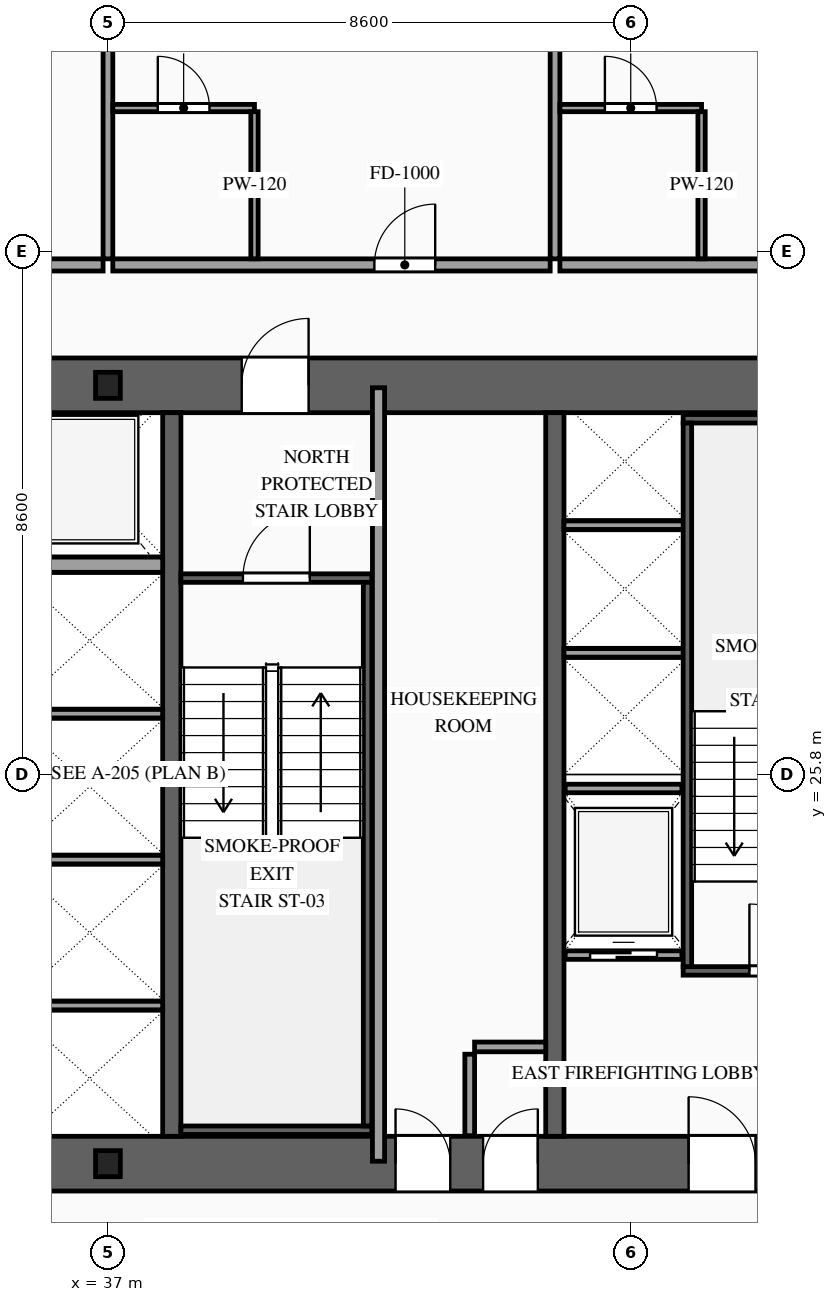
"""IFC4 building model, lengths in metres.
Left out: names, types, materials, properties, quantities, classifications, styles, units other than length and angle.
Written with IfcOpenShell. Run it as: python <this file> out.ifc"""

import sys

from ifc_helpers import new_model, si_unit, direction, frame, frame_2d, origin, origin_2d, place, context, subcontext, project, spatial, rectangle, i_section, extrude, source, transform, mapped, element, fill, save


model = new_model("IFC4")
c1 = context("Model", 3, precision=1e-05, world=origin(), true_north=direction((0.0, 1.0)))
c2 = subcontext(c1, "Body", "Model", "MODEL_VIEW")
j1 = project(units=[si_unit("LENGTHUNIT", "METRE"), si_unit("PLANEANGLEUNIT", "RADIAN")], contexts=[c1])
p1 = place(None, origin())
s1 = spatial("IfcSite", under=j1, at=p1, CompositionType="ELEMENT")
p2 = place(p1, origin())
s2 = spatial("IfcBuilding", under=s1, at=p2, CompositionType="ELEMENT")
p3 = place(p2, frame((0.0, 0.0, 37.8)))
s3 = spatial("IfcBuildingStorey", under=s2, at=p3, CompositionType="ELEMENT", Elevation=37.8)
p4 = place(p3, frame((23.35, 19.4, 0.0), z_axis=(0.0, 0.0, 1.0), x_axis=(1.0, 0.0, 0.0)))
e1 = element("IfcWall", 1, at=p4, inside=s3, PredefinedType="SHEAR", context=c2, shape_type="SweptSolid", body=[
    extrude(rectangle(XDim=27.3, YDim=0.9, at=frame_2d((13.65, 0.0))), origin(), (0.0, 0.0, 1.0), 3.6),
])
p5 = place(p4, frame((2.1, 0.0, 0.0)))
e2 = element("IfcOpeningElement", 2, at=p5, cuts=e1, PredefinedType="OPENING", context=c2, shape_type="SweptSolid", body=[
    extrude(rectangle(XDim=1.1, YDim=2.2, at=frame_2d((0.55, 1.1))), frame((0.0, 0.465, 0.0), z_axis=(0.0, -1.0, 0.0), x_axis=(1.0, 0.0, 0.0)), (0.0, 0.0, 1.0), 0.93),
])
p6 = place(p4, frame((10.0, 0.0, 0.0)))
e3 = element("IfcOpeningElement", 3, at=p6, cuts=e1, PredefinedType="OPENING", context=c2, shape_type="SweptSolid", body=[
    extrude(rectangle(XDim=1.1, YDim=2.2, at=frame_2d((0.55, 1.1))), frame((0.0, 0.465, 0.0), z_axis=(0.0, -1.0, 0.0), x_axis=(1.0, 0.0, 0.0)), (0.0, 0.0, 1.0), 0.93),
])
p7 = place(p4, frame((23.2, 0.0, 0.0)))
e4 = element("IfcOpeningElement", 4, at=p7, cuts=e1, PredefinedType="OPENING", context=c2, shape_type="SweptSolid", body=[
    extrude(rectangle(XDim=1.1, YDim=2.2, at=frame_2d((0.55, 1.1))), frame((0.0, 0.465, 0.0), z_axis=(0.0, -1.0, 0.0), x_axis=(1.0, 0.0, 0.0)), (0.0, 0.0, 1.0), 0.93),
])
p8 = place(p4, frame((19.82, 0.0, 0.0)))
e5 = element("IfcOpeningElement", 5, at=p8, cuts=e1, PredefinedType="OPENING", context=c2, shape_type="SweptSolid", body=[
    extrude(rectangle(XDim=0.9, YDim=2.15, at=frame_2d((0.45, 1.075))), frame((0.0, 0.465, 0.0), z_axis=(0.0, -1.0, 0.0), x_axis=(1.0, 0.0, 0.0)), (0.0, 0.0, 1.0), 0.93),
])
p9 = place(p4, frame((18.38, 0.0, 0.0)))
e6 = element("IfcOpeningElement", 6, at=p9, cuts=e1, PredefinedType="OPENING", context=c2, shape_type="SweptSolid", body=[
    extrude(rectangle(XDim=0.9, YDim=2.15, at=frame_2d((0.45, 1.075))), frame((0.0, 0.465, 0.0), z_axis=(0.0, -1.0, 0.0), x_axis=(1.0, 0.0, 0.0)), (0.0, 0.0, 1.0), 0.93),
])
p10 = place(p3, frame((23.35, 32.2, 0.0), z_axis=(0.0, 0.0, 1.0), x_axis=(1.0, 0.0, 0.0)))
e7 = element("IfcWall", 7, at=p10, inside=s3, PredefinedType="SHEAR", context=c2, shape_type="SweptSolid", body=[
    extrude(rectangle(XDim=27.3, YDim=0.9, at=frame_2d((13.65, 0.0))), origin(), (0.0, 0.0, 1.0), 3.6),
])
p11 = place(p10, frame((4.72, 0.0, 0.0)))
e8 = element("IfcOpeningElement", 8, at=p11, cuts=e7, PredefinedType="OPENING", context=c2, shape_type="SweptSolid", body=[
    extrude(rectangle(XDim=0.9, YDim=2.15, at=frame_2d((0.45, 1.075))), frame((0.0, 0.465, 0.0), z_axis=(0.0, -1.0, 0.0), x_axis=(1.0, 0.0, 0.0)), (0.0, 0.0, 1.0), 0.93),
])
p12 = place(p10, frame((10.0, 0.0, 0.0)))
e9 = element("IfcOpeningElement", 9, at=p12, cuts=e7, PredefinedType="OPENING", context=c2, shape_type="SweptSolid", body=[
    extrude(rectangle(XDim=1.1, YDim=2.2, at=frame_2d((0.55, 1.1))), frame((0.0, 0.465, 0.0), z_axis=(0.0, -1.0, 0.0), x_axis=(1.0, 0.0, 0.0)), (0.0, 0.0, 1.0), 0.93),
])
p13 = place(p10, frame((15.85, 0.0, 0.0)))
e10 = element("IfcOpeningElement", 10, at=p13, cuts=e7, PredefinedType="OPENING", context=c2, shape_type="SweptSolid", body=[
    extrude(rectangle(XDim=1.1, YDim=2.2, at=frame_2d((0.55, 1.1))), frame((0.0, 0.465, 0.0), z_axis=(0.0, -1.0, 0.0), x_axis=(1.0, 0.0, 0.0)), (0.0, 0.0, 1.0), 0.93),
])
m1 = source(origin(), c2, "Body", "SweptSolid", [
    extrude(rectangle(XDim=11.9, YDim=0.3, at=frame_2d((5.95, 0.0))), origin(), (0.0, 0.0, 1.0), 3.6),
])
for number, where, z_axis, x_axis in (
    (11, (38.05, 19.85, 0.0), (0.0, 0.0, 1.0), (0.0, 1.0, 0.0)),
    (12, (44.35, 19.85, 0.0), (0.0, 0.0, 1.0), (0.0, 1.0, 0.0)),
):
    element("IfcWall", number, at=place(p3, frame(where, z_axis=z_axis, x_axis=x_axis)), inside=s3, PredefinedType="SOLIDWALL", context=c2, shape_type="MappedRepresentation", body=[
        mapped(m1, transform((0.0, 0.0, 0.0), scale=1.0)),
    ])
m2 = source(origin(), c2, "Body", "SweptSolid", [
    extrude(i_section(OverallWidth=0.407, OverallDepth=0.428, WebThickness=0.02, FlangeThickness=0.035, at=origin_2d()), origin(), (0.0, 0.0, 1.0), 3.6),
])
for number, where, z_axis, x_axis in (
    (13, (37.0, 19.4, 0.0), (0.0, 0.0, 1.0), (1.0, 0.0, 0.0)),
    (14, (37.0, 32.2, 0.0), (0.0, 0.0, 1.0), (1.0, 0.0, 0.0)),
):
    element("IfcColumn", number, at=place(p3, frame(where, z_axis=z_axis, x_axis=x_axis)), inside=s3, PredefinedType="COLUMN", context=c2, shape_type="MappedRepresentation", body=[
        mapped(m2, transform((0.0, 0.0, 0.0), scale=1.0)),
    ])
p14 = place(p3, frame((44.52, 22.83, 0.0), z_axis=(0.0, 0.0, 1.0), x_axis=(1.0, 0.0, 0.0)))
e15 = element("IfcWall", 15, at=p14, inside=s3, PredefinedType="SOLIDWALL", context=c2, shape_type="SweptSolid", body=[
    extrude(rectangle(XDim=1.92, YDim=0.14, at=frame_2d((0.96, 0.0))), origin(), (0.0, 0.0, 1.0), 3.32),
])
p15 = place(p14, frame((0.41, 0.0, 0.0)))
e16 = element("IfcOpeningElement", 16, at=p15, cuts=e15, PredefinedType="OPENING", context=c2, shape_type="SweptSolid", body=[
    extrude(rectangle(XDim=1.1, YDim=2.2, at=frame_2d((0.55, 1.1))), frame((0.0, 0.085, 0.0), z_axis=(0.0, -1.0, 0.0), x_axis=(1.0, 0.0, 0.0)), (0.0, 0.0, 1.0), 0.17),
])
m3 = source(origin(), c2, "Body", "SweptSolid", [
    extrude(rectangle(XDim=1.92, YDim=0.14, at=frame_2d((0.96, 0.0))), origin(), (0.0, 0.0, 1.0), 3.32),
])
p16 = place(p3, frame((44.52, 25.57, 0.0), z_axis=(0.0, 0.0, 1.0), x_axis=(1.0, 0.0, 0.0)))
e17 = element("IfcWall", 17, at=p16, inside=s3, PredefinedType="SOLIDWALL", context=c2, shape_type="MappedRepresentation", body=[
    mapped(m3, transform((0.0, 0.0, 0.0), scale=1.0)),
])
m4 = source(origin(), c2, "Body", "SweptSolid", [
    extrude(rectangle(XDim=2.4, YDim=0.14, at=frame_2d((1.2, 0.0))), origin(), (0.0, 0.0, 1.0), 3.32),
])
for number, where, z_axis, x_axis in (
    (18, (35.5, 22.0, 0.0), (0.0, 0.0, 1.0), (1.0, 0.0, 0.0)),
    (19, (35.5, 24.4, 0.0), (0.0, 0.0, 1.0), (1.0, 0.0, 0.0)),
    (20, (35.5, 26.8, 0.0), (0.0, 0.0, 1.0), (1.0, 0.0, 0.0)),
):
    element("IfcWall", number, at=place(p3, frame(where, z_axis=z_axis, x_axis=x_axis)), inside=s3, PredefinedType="SOLIDWALL", context=c2, shape_type="MappedRepresentation", body=[
        mapped(m4, transform((0.0, 0.0, 0.0), scale=1.0)),
    ])
m5 = source(origin(), c2, "Body", "SweptSolid", [
    extrude(rectangle(XDim=2.4, YDim=0.25, at=frame_2d((1.2, 0.0))), origin(), (0.0, 0.0, 1.0), 3.32),
])
p17 = place(p3, frame((35.5, 29.25, 0.0), z_axis=(0.0, 0.0, 1.0), x_axis=(1.0, 0.0, 0.0)))
e21 = element("IfcWall", 21, at=p17, inside=s3, PredefinedType="SOLIDWALL", context=c2, shape_type="MappedRepresentation", body=[
    mapped(m5, transform((0.0, 0.0, 0.0), scale=1.0)),
])
m6 = source(origin(), c2, "Body", "SweptSolid", [
    extrude(rectangle(XDim=2.0, YDim=0.14, at=frame_2d((1.0, 0.0))), origin(), (0.0, 0.0, 1.0), 3.32),
])
for number, where, z_axis, x_axis in (
    (22, (44.5, 27.8, 0.0), (0.0, 0.0, 1.0), (1.0, 0.0, 0.0)),
    (23, (44.5, 29.9, 0.0), (0.0, 0.0, 1.0), (1.0, 0.0, 0.0)),
):
    element("IfcWall", number, at=place(p3, frame(where, z_axis=z_axis, x_axis=x_axis)), inside=s3, PredefinedType="SOLIDWALL", context=c2, shape_type="MappedRepresentation", body=[
        mapped(m6, transform((0.0, 0.0, 0.0), scale=1.0)),
    ])
p18 = place(p3, frame((46.46, 22.57, 0.0), z_axis=(0.0, 0.0, 1.0), x_axis=(1.0, 0.0, 0.0)))
e24 = element("IfcWall", 24, at=p18, inside=s3, PredefinedType="SOLIDWALL", context=c2, shape_type="SweptSolid", body=[
    extrude(rectangle(XDim=3.28, YDim=0.14, at=frame_2d((1.64, 0.0))), origin(), (0.0, 0.0, 1.0), 3.32),
])
p19 = place(p18, frame((1.09, 0.0, 0.0)))
e25 = element("IfcOpeningElement", 25, at=p19, cuts=e24, PredefinedType="OPENING", context=c2, shape_type="SweptSolid", body=[
    extrude(rectangle(XDim=1.1, YDim=2.2, at=frame_2d((0.55, 1.1))), frame((0.0, 0.085, 0.0), z_axis=(0.0, -1.0, 0.0), x_axis=(1.0, 0.0, 0.0)), (0.0, 0.0, 1.0), 0.17),
])
m7 = source(origin(), c2, "Body", "SweptSolid", [
    extrude(rectangle(XDim=3.28, YDim=0.14, at=frame_2d((1.64, 0.0))), origin(), (0.0, 0.0, 1.0), 3.32),
])
p20 = place(p3, frame((46.46, 31.65, 0.0), z_axis=(0.0, 0.0, 1.0), x_axis=(1.0, 0.0, 0.0)))
e26 = element("IfcWall", 26, at=p20, inside=s3, PredefinedType="SOLIDWALL", context=c2, shape_type="MappedRepresentation", body=[
    mapped(m7, transform((0.0, 0.0, 0.0), scale=1.0)),
])
m8 = source(origin(), c2, "Body", "SweptSolid", [
    extrude(rectangle(XDim=8.94, YDim=0.14, at=frame_2d((4.47, 0.0))), origin(), (0.0, 0.0, 1.0), 3.32),
])
p21 = place(p3, frame((46.53, 22.64, 0.0), z_axis=(0.0, 0.0, 1.0), x_axis=(0.0, 1.0, 0.0)))
e27 = element("IfcWall", 27, at=p21, inside=s3, PredefinedType="SOLIDWALL", context=c2, shape_type="MappedRepresentation", body=[
    mapped(m8, transform((0.0, 0.0, 0.0), scale=1.0)),
])
p22 = place(p3, frame((38.2, 29.03, 0.0), z_axis=(0.0, 0.0, 1.0), x_axis=(1.0, 0.0, 0.0)))
e28 = element("IfcWall", 28, at=p22, inside=s3, PredefinedType="SOLIDWALL", context=c2, shape_type="SweptSolid", body=[
    extrude(rectangle(XDim=3.14, YDim=0.14, at=frame_2d((1.57, 0.0))), origin(), (0.0, 0.0, 1.0), 3.32),
])
p23 = place(p22, frame((1.02, 0.0, 0.0)))
e29 = element("IfcOpeningElement", 29, at=p23, cuts=e28, PredefinedType="OPENING", context=c2, shape_type="SweptSolid", body=[
    extrude(rectangle(XDim=1.1, YDim=2.2, at=frame_2d((0.55, 1.1))), frame((0.0, 0.085, 0.0), z_axis=(0.0, -1.0, 0.0), x_axis=(1.0, 0.0, 0.0)), (0.0, 0.0, 1.0), 0.17),
])
m9 = source(origin(), c2, "Body", "SweptSolid", [
    extrude(rectangle(XDim=3.14, YDim=0.14, at=frame_2d((1.57, 0.0))), origin(), (0.0, 0.0, 1.0), 3.32),
])
p24 = place(p3, frame((38.2, 19.95, 0.0), z_axis=(0.0, 0.0, 1.0), x_axis=(1.0, 0.0, 0.0)))
e30 = element("IfcWall", 30, at=p24, inside=s3, PredefinedType="SOLIDWALL", context=c2, shape_type="MappedRepresentation", body=[
    mapped(m9, transform((0.0, 0.0, 0.0), scale=1.0)),
])
m10 = source(origin(), c2, "Body", "SweptSolid", [
    extrude(rectangle(XDim=8.94, YDim=0.14, at=frame_2d((4.47, 0.0))), origin(), (0.0, 0.0, 1.0), 3.32),
])
p25 = place(p3, frame((41.27, 20.02, 0.0), z_axis=(0.0, 0.0, 1.0), x_axis=(0.0, 1.0, 0.0)))
e31 = element("IfcWall", 31, at=p25, inside=s3, PredefinedType="SOLIDWALL", context=c2, shape_type="MappedRepresentation", body=[
    mapped(m10, transform((0.0, 0.0, 0.0), scale=1.0)),
])
m11 = source(origin(), c2, "Body", "SweptSolid", [
    extrude(rectangle(XDim=1.34, YDim=0.16, at=frame_2d((0.67, 0.0))), origin(), (0.0, 0.0, 1.0), 3.32),
])
p26 = place(p3, frame((42.95, 19.86, 0.0), z_axis=(0.0, 0.0, 1.0), x_axis=(0.0, 1.0, 0.0)))
e32 = element("IfcWall", 32, at=p26, inside=s3, PredefinedType="PARTITIONING", context=c2, shape_type="MappedRepresentation", body=[
    mapped(m11, transform((0.0, 0.0, 0.0), scale=1.0)),
])
m12 = source(origin(), c2, "Body", "SweptSolid", [
    extrude(rectangle(XDim=1.17, YDim=0.16, at=frame_2d((0.585, 0.0))), origin(), (0.0, 0.0, 1.0), 3.32),
])
p27 = place(p3, frame((43.03, 21.32, 0.0), z_axis=(0.0, 0.0, 1.0), x_axis=(1.0, 0.0, 0.0)))
e33 = element("IfcWall", 33, at=p27, inside=s3, PredefinedType="PARTITIONING", context=c2, shape_type="MappedRepresentation", body=[
    mapped(m12, transform((0.0, 0.0, 0.0), scale=1.0)),
])
m13 = source(origin(), c2, "Body", "SweptSolid", [
    extrude(rectangle(XDim=12.72, YDim=0.2, at=frame_2d((6.36, 0.0))), origin(), (0.0, 0.0, 1.0), 3.32),
])
p28 = place(p3, frame((41.45, 19.44, 0.0), z_axis=(0.0, 0.0, 1.0), x_axis=(0.0, 1.0, 0.0)))
e34 = element("IfcWall", 34, at=p28, inside=s3, PredefinedType="PARTITIONING", context=c2, shape_type="MappedRepresentation", body=[
    mapped(m13, transform((0.0, 0.0, 0.0), scale=1.0)),
])
p29 = place(p3, frame((29.727, 34.18, 0.0), z_axis=(0.0, 0.0, 1.0), x_axis=(1.0, 0.0, 0.0)))
e35 = element("IfcWall", 35, at=p29, inside=s3, PredefinedType="PARTITIONING", context=c2, shape_type="SweptSolid", body=[
    extrude(rectangle(XDim=7.193, YDim=0.2, at=frame_2d((3.596, 0.0))), origin(), (0.0, 0.0, 1.0), 3.32),
])
p30 = place(p29, frame((4.302, 0.0, 0.0)))
e36 = element("IfcOpeningElement", 36, at=p30, cuts=e35, PredefinedType="OPENING", context=c2, shape_type="SweptSolid", body=[
    extrude(rectangle(XDim=1.0, YDim=2.2, at=frame_2d((0.5, 1.1))), frame((0.0, 0.115, 0.0), z_axis=(0.0, -1.0, 0.0), x_axis=(1.0, 0.0, 0.0)), (0.0, 0.0, 1.0), 0.23),
])
m14 = source(origin(), c2, "Body", "SweptSolid", [
    extrude(rectangle(XDim=16.47, YDim=0.16, at=frame_2d((8.235, 0.0))), origin(), (0.0, 0.0, 1.0), 2.515),
])
p31 = place(p3, frame((37.0, 34.28, 0.0), z_axis=(0.0, 0.0, 1.0), x_axis=(0.0, 1.0, 0.0)))
e37 = element("IfcWall", 37, at=p31, inside=s3, PredefinedType="PARTITIONING", context=c2, shape_type="MappedRepresentation", body=[
    mapped(m14, transform((0.0, 0.0, 0.0), scale=1.0)),
])
p32 = place(p3, frame((37.08, 34.18, 0.0), z_axis=(0.0, 0.0, 1.0), x_axis=(1.0, 0.0, 0.0)))
e38 = element("IfcWall", 38, at=p32, inside=s3, PredefinedType="PARTITIONING", context=c2, shape_type="SweptSolid", body=[
    extrude(rectangle(XDim=7.193, YDim=0.2, at=frame_2d((3.596, 0.0))), origin(), (0.0, 0.0, 1.0), 3.32),
])
p33 = place(p32, frame((4.302, 0.0, 0.0)))
e39 = element("IfcOpeningElement", 39, at=p33, cuts=e38, PredefinedType="OPENING", context=c2, shape_type="SweptSolid", body=[
    extrude(rectangle(XDim=1.0, YDim=2.2, at=frame_2d((0.5, 1.1))), frame((0.0, 0.115, 0.0), z_axis=(0.0, -1.0, 0.0), x_axis=(1.0, 0.0, 0.0)), (0.0, 0.0, 1.0), 0.23),
])
m15 = source(origin(), c2, "Body", "SweptSolid", [
    extrude(rectangle(XDim=16.47, YDim=0.16, at=frame_2d((8.235, 0.0))), origin(), (0.0, 0.0, 1.0), 3.32),
])
p34 = place(p3, frame((44.353, 34.28, 0.0), z_axis=(0.0, 0.0, 1.0), x_axis=(0.0, 1.0, 0.0)))
e40 = element("IfcWall", 40, at=p34, inside=s3, PredefinedType="PARTITIONING", context=c2, shape_type="MappedRepresentation", body=[
    mapped(m15, transform((0.0, 0.0, 0.0), scale=1.0)),
])
p35 = place(p3, frame((37.08, 36.76, 0.0), z_axis=(0.0, 0.0, 1.0), x_axis=(1.0, 0.0, 0.0)))
e41 = element("IfcWall", 41, at=p35, inside=s3, PredefinedType="PARTITIONING", context=c2, shape_type="SweptSolid", body=[
    extrude(rectangle(XDim=2.33, YDim=0.12, at=frame_2d((1.165, 0.0))), origin(), (0.0, 0.0, 1.0), 3.32),
])
p36 = place(p35, frame((0.74, 0.0, 0.0)))
e42 = element("IfcOpeningElement", 42, at=p36, cuts=e41, PredefinedType="OPENING", context=c2, shape_type="SweptSolid", body=[
    extrude(rectangle(XDim=0.85, YDim=2.1, at=frame_2d((0.425, 1.05))), frame((0.0, 0.075, 0.0), z_axis=(0.0, -1.0, 0.0), x_axis=(1.0, 0.0, 0.0)), (0.0, 0.0, 1.0), 0.15),
])
m16 = source(origin(), c2, "Body", "SweptSolid", [
    extrude(rectangle(XDim=2.42, YDim=0.12, at=frame_2d((1.21, 0.0))), origin(), (0.0, 0.0, 1.0), 3.32),
])
p37 = place(p3, frame((39.41, 34.28, 0.0), z_axis=(0.0, 0.0, 1.0), x_axis=(0.0, 1.0, 0.0)))
e43 = element("IfcWall", 43, at=p37, inside=s3, PredefinedType="PARTITIONING", context=c2, shape_type="MappedRepresentation", body=[
    mapped(m16, transform((0.0, 0.0, 0.0), scale=1.0)),
])
p38 = place(p3, frame((44.433, 34.18, 0.0), z_axis=(0.0, 0.0, 1.0), x_axis=(1.0, 0.0, 0.0)))
e44 = element("IfcWall", 44, at=p38, inside=s3, PredefinedType="PARTITIONING", context=c2, shape_type="SweptSolid", body=[
    extrude(rectangle(XDim=7.194, YDim=0.2, at=frame_2d((3.597, 0.0))), origin(), (0.0, 0.0, 1.0), 3.32),
])
p39 = place(p38, frame((4.302, 0.0, 0.0)))
e45 = element("IfcOpeningElement", 45, at=p39, cuts=e44, PredefinedType="OPENING", context=c2, shape_type="SweptSolid", body=[
    extrude(rectangle(XDim=1.0, YDim=2.2, at=frame_2d((0.5, 1.1))), frame((0.0, 0.115, 0.0), z_axis=(0.0, -1.0, 0.0), x_axis=(1.0, 0.0, 0.0)), (0.0, 0.0, 1.0), 0.23),
])
p40 = place(p3, frame((44.433, 36.76, 0.0), z_axis=(0.0, 0.0, 1.0), x_axis=(1.0, 0.0, 0.0)))
e46 = element("IfcWall", 46, at=p40, inside=s3, PredefinedType="PARTITIONING", context=c2, shape_type="SweptSolid", body=[
    extrude(rectangle(XDim=2.33, YDim=0.12, at=frame_2d((1.165, 0.0))), origin(), (0.0, 0.0, 1.0), 3.32),
])
p41 = place(p40, frame((0.74, 0.0, 0.0)))
e47 = element("IfcOpeningElement", 47, at=p41, cuts=e46, PredefinedType="OPENING", context=c2, shape_type="SweptSolid", body=[
    extrude(rectangle(XDim=0.85, YDim=2.1, at=frame_2d((0.425, 1.05))), frame((0.0, 0.075, 0.0), z_axis=(0.0, -1.0, 0.0), x_axis=(1.0, 0.0, 0.0)), (0.0, 0.0, 1.0), 0.15),
])
p42 = place(p3, frame((46.763, 34.28, 0.0), z_axis=(0.0, 0.0, 1.0), x_axis=(0.0, 1.0, 0.0)))
e48 = element("IfcWall", 48, at=p42, inside=s3, PredefinedType="PARTITIONING", context=c2, shape_type="MappedRepresentation", body=[
    mapped(m16, transform((0.0, 0.0, 0.0), scale=1.0)),
])
m17 = source(origin(), c2, "Body", "SweptSolid", [
    extrude(rectangle(XDim=1.1, YDim=2.2, at=frame_2d((0.55, 1.1))), frame((0.0, 0.025, 0.0), z_axis=(0.0, -1.0, 0.0), x_axis=(1.0, 0.0, 0.0)), (0.0, 0.0, 1.0), 0.05),
])
p43 = place(p15, origin())
e49 = element("IfcDoor", 49, at=p43, inside=s3, OperationType="SLIDING_TO_RIGHT", PredefinedType="DOOR", context=c2, shape_type="MappedRepresentation", body=[
    mapped(m17, transform((0.0, 0.0, 0.0), scale=1.0)),
])
fill(e16, e49)
m18 = source(origin(), c2, "Body", "SweptSolid", [
    extrude(rectangle(XDim=1.1, YDim=2.2, at=frame_2d((0.55, 1.1))), frame((0.0, 0.025, 0.0), z_axis=(0.0, -1.0, 0.0), x_axis=(1.0, 0.0, 0.0)), (0.0, 0.0, 1.0), 0.05),
])
p44 = place(p19, origin())
e50 = element("IfcDoor", 50, at=p44, inside=s3, OperationType="SINGLE_SWING_LEFT", PredefinedType="DOOR", context=c2, shape_type="MappedRepresentation", body=[
    mapped(m18, transform((0.0, 0.0, 0.0), scale=1.0)),
])
fill(e25, e50)
p45 = place(p23, origin())
e51 = element("IfcDoor", 51, at=p45, inside=s3, OperationType="SINGLE_SWING_RIGHT", PredefinedType="DOOR", context=c2, shape_type="MappedRepresentation", body=[
    mapped(m18, transform((0.0, 0.0, 0.0), scale=1.0)),
])
fill(e29, e51)
p46 = place(p7, origin())
e52 = element("IfcDoor", 52, at=p46, inside=s3, OperationType="SINGLE_SWING_LEFT", PredefinedType="DOOR", context=c2, shape_type="MappedRepresentation", body=[
    mapped(m18, transform((0.0, 0.0, 0.0), scale=1.0)),
])
fill(e4, e52)
p47 = place(p13, origin())
e53 = element("IfcDoor", 53, at=p47, inside=s3, OperationType="SINGLE_SWING_RIGHT", PredefinedType="DOOR", context=c2, shape_type="MappedRepresentation", body=[
    mapped(m18, transform((0.0, 0.0, 0.0), scale=1.0)),
])
fill(e10, e53)
m19 = source(origin(), c2, "Body", "SweptSolid", [
    extrude(rectangle(XDim=0.9, YDim=2.15, at=frame_2d((0.45, 1.075))), frame((0.0, 0.025, 0.0), z_axis=(0.0, -1.0, 0.0), x_axis=(1.0, 0.0, 0.0)), (0.0, 0.0, 1.0), 0.05),
])
p48 = place(p8, origin())
e54 = element("IfcDoor", 54, at=p48, inside=s3, OperationType="SINGLE_SWING_RIGHT", PredefinedType="DOOR", context=c2, shape_type="MappedRepresentation", body=[
    mapped(m19, transform((0.0, 0.0, 0.0), scale=1.0)),
])
fill(e5, e54)
p49 = place(p9, origin())
e55 = element("IfcDoor", 55, at=p49, inside=s3, OperationType="SINGLE_SWING_LEFT", PredefinedType="DOOR", context=c2, shape_type="MappedRepresentation", body=[
    mapped(m19, transform((0.0, 0.0, 0.0), scale=1.0)),
])
fill(e6, e55)
m20 = source(origin(), c2, "Body", "SweptSolid", [
    extrude(rectangle(XDim=1.0, YDim=2.2, at=frame_2d((0.5, 1.1))), frame((0.0, 0.025, 0.0), z_axis=(0.0, -1.0, 0.0), x_axis=(1.0, 0.0, 0.0)), (0.0, 0.0, 1.0), 0.05),
])
p50 = place(p33, origin())
e56 = element("IfcDoor", 56, at=p50, inside=s3, OperationType="SINGLE_SWING_RIGHT", PredefinedType="DOOR", context=c2, shape_type="MappedRepresentation", body=[
    mapped(m20, transform((0.0, 0.0, 0.0), scale=1.0)),
])
fill(e39, e56)
m21 = source(origin(), c2, "Body", "SweptSolid", [
    extrude(rectangle(XDim=0.85, YDim=2.1, at=frame_2d((0.425, 1.05))), frame((0.0, 0.025, 0.0), z_axis=(0.0, -1.0, 0.0), x_axis=(1.0, 0.0, 0.0)), (0.0, 0.0, 1.0), 0.05),
])
p51 = place(p36, origin())
e57 = element("IfcDoor", 57, at=p51, inside=s3, OperationType="SINGLE_SWING_LEFT", PredefinedType="DOOR", context=c2, shape_type="MappedRepresentation", body=[
    mapped(m21, transform((0.0, 0.0, 0.0), scale=1.0)),
])
fill(e42, e57)
p52 = place(p41, origin())
e58 = element("IfcDoor", 58, at=p52, inside=s3, OperationType="SINGLE_SWING_LEFT", PredefinedType="DOOR", context=c2, shape_type="MappedRepresentation", body=[
    mapped(m21, transform((0.0, 0.0, 0.0), scale=1.0)),
])
fill(e47, e58)
save(model, sys.argv[1])
